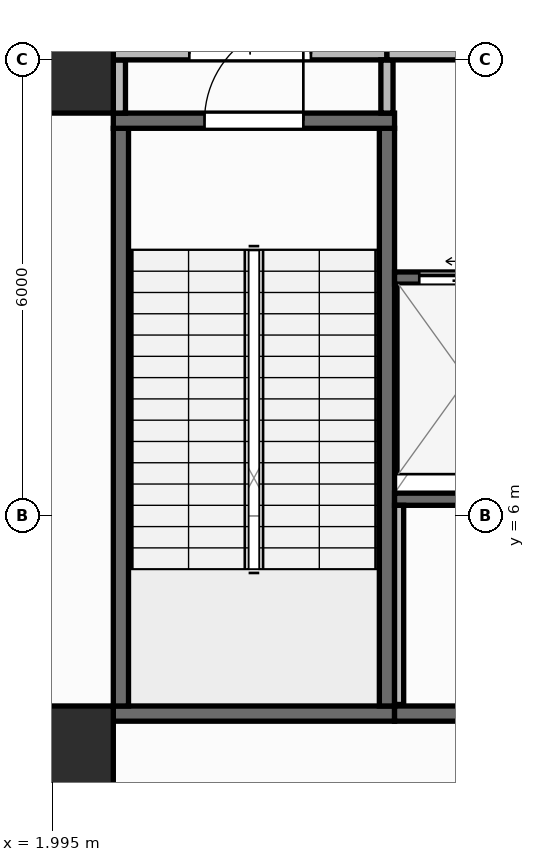
"""IFC4 building model, lengths in metres.
Left out: names, types, materials, properties, quantities, classifications, styles, units other than length and angle.
Written with IfcOpenShell. Run it as: python <this file> out.ifc"""

import sys

from ifc_helpers import new_model, si_unit, direction, frame, frame_2d, origin, origin_2d, place, context, subcontext, project, spatial, rectangle, extrude, element, fill, save


model = new_model("IFC4")
c1 = context("Model", 3, precision=1e-05, world=origin(), true_north=direction((0.0, 1.0)))
c2 = subcontext(c1, "Body", "Model", "MODEL_VIEW")
j1 = project(units=[si_unit("LENGTHUNIT", "METRE"), si_unit("PLANEANGLEUNIT", "RADIAN")], contexts=[c1])
p1 = place(None, origin())
s1 = spatial("IfcSite", under=j1, at=p1, CompositionType="ELEMENT")
p2 = place(p1, origin())
s2 = spatial("IfcBuilding", under=s1, at=p2, CompositionType="ELEMENT")
p3 = place(p2, frame((0.0, 0.0, 97.55)))
s3 = spatial("IfcBuildingStorey", under=s2, at=p3, CompositionType="ELEMENT", Elevation=97.55)
for number, where, z_axis, x_axis in (
    (1, (2.1, 2.8, 0.0), (0.0, 0.0, 1.0), (1.0, 0.0, 0.0)),
    (2, (2.1, 12.0, 0.0), (0.0, 0.0, 1.0), (1.0, 0.0, 0.0)),
):
    element("IfcColumn", number, at=place(p3, frame(where, z_axis=z_axis, x_axis=x_axis)), inside=s3, PredefinedType="COLUMN", context=c2, shape_type="SweptSolid", body=[
        extrude(rectangle(XDim=1.4, YDim=1.4, at=origin_2d()), origin(), (0.0, 0.0, 1.0), 5.8),
    ])
p4 = place(p3, frame((2.8, 3.4, 0.0), z_axis=(0.0, 0.0, 1.0), x_axis=(1.0, 0.0, 0.0)))
e3 = element("IfcWall", 3, at=p4, inside=s3, PredefinedType="SHEAR", context=c2, shape_type="SweptSolid", body=[
    extrude(rectangle(XDim=3.7, YDim=0.2, at=frame_2d((1.85, 0.0))), origin(), (0.0, 0.0, 1.0), 5.56),
])
for number, where, z_axis, x_axis in (
    (4, (2.9, 3.5, 0.0), (0.0, 0.0, 1.0), (0.0, 1.0, 0.0)),
    (5, (6.4, 3.5, 0.0), (0.0, 0.0, 1.0), (0.0, 1.0, 0.0)),
):
    element("IfcWall", number, at=place(p3, frame(where, z_axis=z_axis, x_axis=x_axis)), inside=s3, PredefinedType="SHEAR", context=c2, shape_type="SweptSolid", body=[
        extrude(rectangle(XDim=7.6, YDim=0.2, at=frame_2d((3.8, 0.0))), origin(), (0.0, 0.0, 1.0), 5.56),
    ])
p5 = place(p3, frame((2.8, 11.2, 0.0), z_axis=(0.0, 0.0, 1.0), x_axis=(1.0, 0.0, 0.0)))
e6 = element("IfcWall", 6, at=p5, inside=s3, PredefinedType="SHEAR", context=c2, shape_type="SweptSolid", body=[
    extrude(rectangle(XDim=3.7, YDim=0.2, at=frame_2d((1.85, 0.0))), origin(), (0.0, 0.0, 1.0), 5.56),
])
p6 = place(p5, frame((1.2, 0.0, 0.0)))
e7 = element("IfcOpeningElement", 7, at=p6, cuts=e6, PredefinedType="OPENING", context=c2, shape_type="SweptSolid", body=[
    extrude(rectangle(XDim=1.3, YDim=2.15, at=frame_2d((0.65, 1.075))), frame((0.0, 0.11, 0.0), z_axis=(0.0, -1.0, 0.0), x_axis=(1.0, 0.0, 0.0)), (0.0, 0.0, 1.0), 0.22),
])
p7 = place(p3, frame((6.5, 3.4, 0.0), z_axis=(0.0, 0.0, 1.0), x_axis=(1.0, 0.0, 0.0)))
e8 = element("IfcWall", 8, at=p7, inside=s3, PredefinedType="SHEAR", context=c2, shape_type="SweptSolid", body=[
    extrude(rectangle(XDim=13.7, YDim=0.2, at=frame_2d((6.85, 0.0))), origin(), (0.0, 0.0, 1.0), 5.56),
])
p8 = place(p3, frame((6.5, 6.22, 0.0), z_axis=(0.0, 0.0, 1.0), x_axis=(1.0, 0.0, 0.0)))
e9 = element("IfcWall", 9, at=p8, inside=s3, PredefinedType="SHEAR", context=c2, shape_type="SweptSolid", body=[
    extrude(rectangle(XDim=12.11, YDim=0.16, at=frame_2d((6.055, 0.0))), origin(), (0.0, 0.0, 1.0), 5.56),
])
p9 = place(p3, frame((6.5, 9.13, 0.0), z_axis=(0.0, 0.0, 1.0), x_axis=(1.0, 0.0, 0.0)))
e10 = element("IfcWall", 10, at=p9, inside=s3, PredefinedType="SHEAR", context=c2, shape_type="SweptSolid", body=[
    extrude(rectangle(XDim=1.975, YDim=0.16, at=frame_2d((0.988, 0.0))), origin(), (0.0, 0.0, 1.0), 5.56),
])
p10 = place(p9, frame((0.325, 0.0, 0.0)))
e11 = element("IfcOpeningElement", 11, at=p10, cuts=e10, PredefinedType="OPENING", context=c2, shape_type="SweptSolid", body=[
    extrude(rectangle(XDim=1.25, YDim=2.15, at=frame_2d((0.625, 1.075))), frame((0.0, 0.09, 0.0), z_axis=(0.0, -1.0, 0.0), x_axis=(1.0, 0.0, 0.0)), (0.0, 0.0, 1.0), 0.18),
])
p11 = place(p3, frame((6.56, 3.52, 0.0), z_axis=(0.0, 0.0, 1.0), x_axis=(0.0, 1.0, 0.0)))
e12 = element("IfcWall", 12, at=p11, inside=s3, PredefinedType="PARTITIONING", context=c2, shape_type="SweptSolid", body=[
    extrude(rectangle(XDim=2.62, YDim=0.12, at=frame_2d((1.31, 0.0))), origin(), (0.0, 0.0, 1.0), 5.56),
])
p12 = place(p3, frame((2.88, 11.3, 0.0), z_axis=(0.0, 0.0, 1.0), x_axis=(0.0, 1.0, 0.0)))
e13 = element("IfcWall", 13, at=p12, inside=s3, PredefinedType="PARTITIONING", context=c2, shape_type="SweptSolid", body=[
    extrude(rectangle(XDim=0.7, YDim=0.16, at=frame_2d((0.35, 0.0))), origin(), (0.0, 0.0, 1.0), 5.56),
])
p13 = place(p3, frame((2.8, 12.08, 0.0), z_axis=(0.0, 0.0, 1.0), x_axis=(1.0, 0.0, 0.0)))
e14 = element("IfcWall", 14, at=p13, inside=s3, PredefinedType="PARTITIONING", context=c2, shape_type="SweptSolid", body=[
    extrude(rectangle(XDim=3.6, YDim=0.16, at=frame_2d((1.8, 0.0))), origin(), (0.0, 0.0, 1.0), 4.835),
])
p14 = place(p13, frame((1.0, 0.0, 0.0)))
e15 = element("IfcOpeningElement", 15, at=p14, cuts=e14, PredefinedType="OPENING", context=c2, shape_type="SweptSolid", body=[
    extrude(rectangle(XDim=1.6, YDim=2.05, at=frame_2d((0.8, 1.025))), frame((0.0, 0.09, 0.0), z_axis=(0.0, -1.0, 0.0), x_axis=(1.0, 0.0, 0.0)), (0.0, 0.0, 1.0), 0.18),
])
p15 = place(p3, frame((6.4, 11.3, 0.0), z_axis=(0.0, 0.0, 1.0), x_axis=(0.0, 1.0, 0.0)))
e16 = element("IfcWall", 16, at=p15, inside=s3, PredefinedType="PARTITIONING", context=c2, shape_type="SweptSolid", body=[
    extrude(rectangle(XDim=0.7, YDim=0.16, at=frame_2d((0.35, 0.0))), origin(), (0.0, 0.0, 1.0), 5.56),
])
p16 = place(p3, frame((6.4, 12.08, 0.0), z_axis=(0.0, 0.0, 1.0), x_axis=(1.0, 0.0, 0.0)))
e17 = element("IfcWall", 17, at=p16, inside=s3, PredefinedType="PARTITIONING", context=c2, shape_type="SweptSolid", body=[
    extrude(rectangle(XDim=6.18, YDim=0.16, at=frame_2d((3.09, 0.0))), origin(), (0.0, 0.0, 1.0), 4.835),
])
p17 = place(p16, frame((2.29, 0.0, 0.0)))
e18 = element("IfcOpeningElement", 18, at=p17, cuts=e17, PredefinedType="OPENING", context=c2, shape_type="SweptSolid", body=[
    extrude(rectangle(XDim=1.6, YDim=2.05, at=frame_2d((0.8, 1.025))), frame((0.0, 0.09, 0.0), z_axis=(0.0, -1.0, 0.0), x_axis=(1.0, 0.0, 0.0)), (0.0, 0.0, 1.0), 0.18),
])
p18 = place(p6, origin())
e19 = element("IfcDoor", 19, at=p18, inside=s3, OperationType="SINGLE_SWING_RIGHT", PredefinedType="DOOR", context=c2, shape_type="SweptSolid", body=[
    extrude(rectangle(XDim=1.3, YDim=2.15, at=frame_2d((0.65, 1.075))), frame((0.0, 0.025, 0.0), z_axis=(0.0, -1.0, 0.0), x_axis=(1.0, 0.0, 0.0)), (0.0, 0.0, 1.0), 0.05),
])
fill(e7, e19)
p19 = place(p10, origin())
e20 = element("IfcDoor", 20, at=p19, inside=s3, OperationType="SLIDING_TO_LEFT", PredefinedType="DOOR", context=c2, shape_type="SweptSolid", body=[
    extrude(rectangle(XDim=1.25, YDim=2.15, at=frame_2d((0.625, 1.075))), frame((0.0, 0.025, 0.0), z_axis=(0.0, -1.0, 0.0), x_axis=(1.0, 0.0, 0.0)), (0.0, 0.0, 1.0), 0.05),
])
fill(e11, e20)
p20 = place(p14, origin())
e21 = element("IfcDoor", 21, at=p20, inside=s3, OperationType="DOUBLE_DOOR_SINGLE_SWING", PredefinedType="DOOR", context=c2, shape_type="SweptSolid", body=[
    extrude(rectangle(XDim=1.6, YDim=2.05, at=frame_2d((0.8, 1.025))), frame((0.0, 0.025, 0.0), z_axis=(0.0, -1.0, 0.0), x_axis=(1.0, 0.0, 0.0)), (0.0, 0.0, 1.0), 0.05),
])
fill(e15, e21)
save(model, sys.argv[1])
